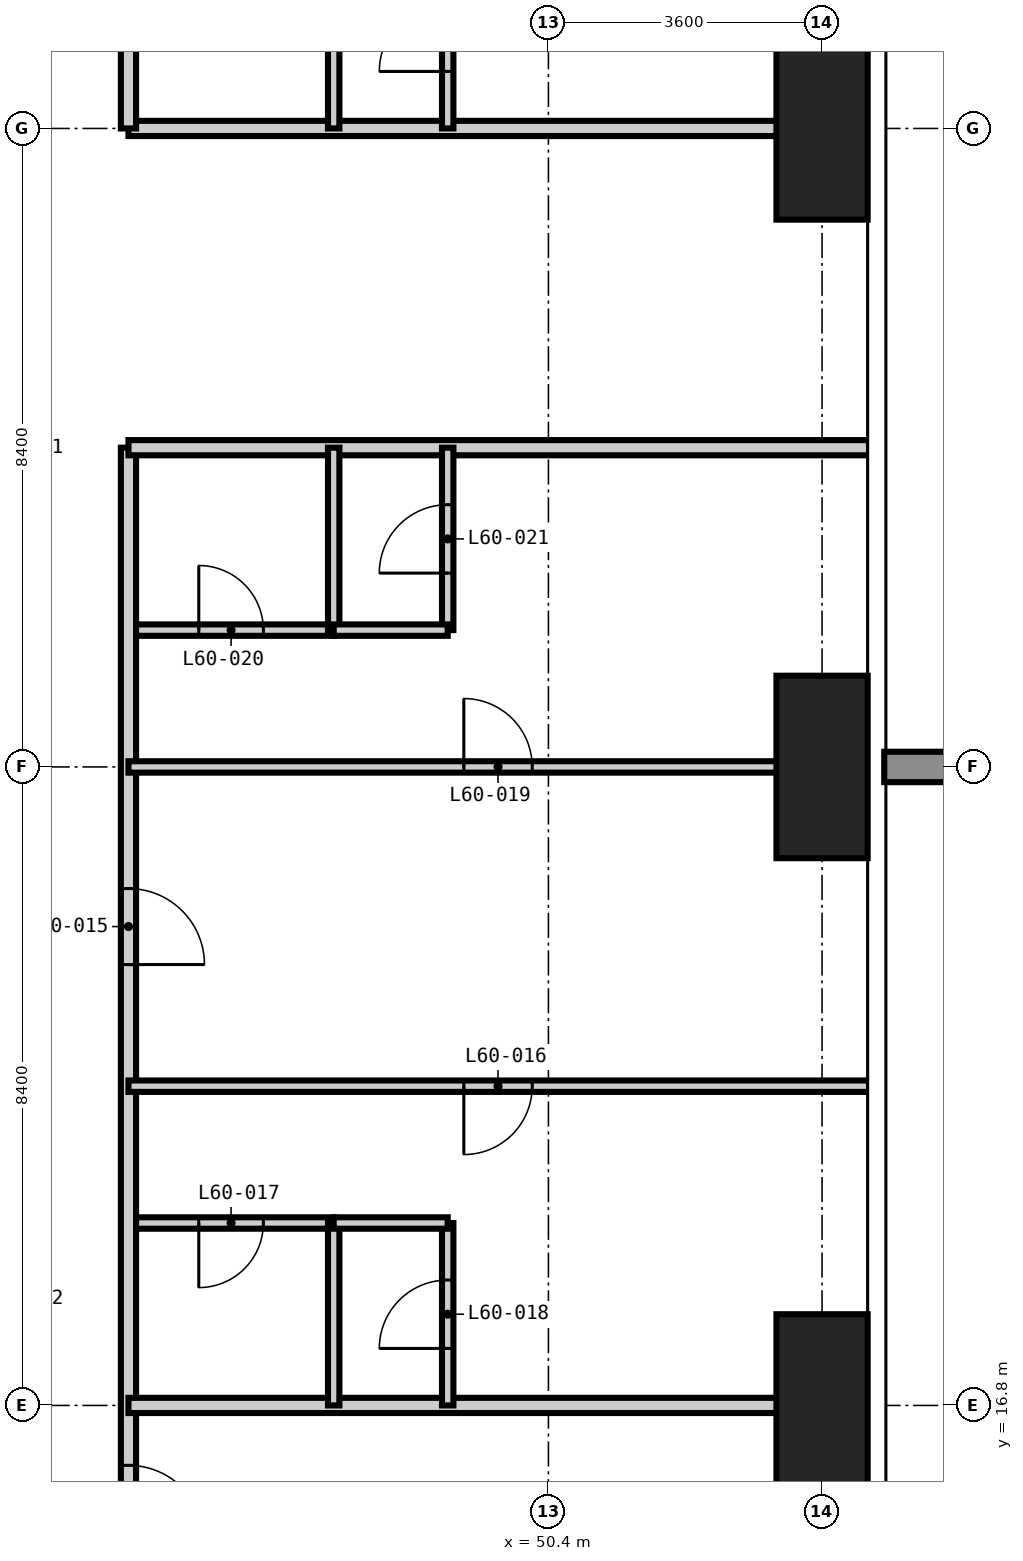
"""IFC4 building model, lengths in metres.
Left out: names, types, materials, properties, quantities, classifications, styles, units other than length and angle.
Written with IfcOpenShell. Run it as: python <this file> out.ifc"""

import sys

from ifc_helpers import new_model, si_unit, direction, frame, frame_2d, origin, origin_2d, place, context, subcontext, project, spatial, rectangle, extrude, element, fill, save


model = new_model("IFC4")
c1 = context("Model", 3, precision=1e-05, world=origin(), true_north=direction((0.0, 1.0)))
c2 = subcontext(c1, "Body", "Model", "MODEL_VIEW")
j1 = project(units=[si_unit("LENGTHUNIT", "METRE"), si_unit("PLANEANGLEUNIT", "RADIAN")], contexts=[c1])
p1 = place(None, origin())
s1 = spatial("IfcSite", under=j1, at=p1, CompositionType="ELEMENT")
p2 = place(p1, origin())
s2 = spatial("IfcBuilding", under=s1, at=p2, CompositionType="ELEMENT")
p3 = place(p2, frame((0.0, 0.0, 233.4)))
s3 = spatial("IfcBuildingStorey", under=s2, at=p3, CompositionType="ELEMENT", Elevation=233.4)
for number, where, z_axis, x_axis in (
    (1, (54.0, 16.8, -0.35), (0.0, 0.0, 1.0), (1.0, 0.0, 0.0)),
    (2, (54.0, 25.2, -0.35), (0.0, 0.0, 1.0), (1.0, 0.0, 0.0)),
    (3, (54.0, 33.6, -0.35), (0.0, 0.0, 1.0), (1.0, 0.0, 0.0)),
):
    element("IfcColumn", number, at=place(p3, frame(where, z_axis=z_axis, x_axis=x_axis)), inside=s3, PredefinedType="COLUMN", context=c2, shape_type="SweptSolid", body=[
        extrude(rectangle(XDim=1.2, YDim=2.4, at=origin_2d()), origin(), (0.0, 0.0, 1.0), 3.9),
    ])
p4 = place(p3, frame((44.875, 19.2, 0.0), z_axis=(0.0, 0.0, 1.0), x_axis=(1.0, 0.0, 0.0)))
e4 = element("IfcWall", 4, at=p4, inside=s3, PredefinedType="PARTITIONING", context=c2, shape_type="SweptSolid", body=[
    extrude(rectangle(XDim=2.7, YDim=0.15, at=frame_2d((1.35, 0.0))), origin(), (0.0, 0.0, 1.0), 3.55),
])
p5 = place(p4, frame((0.925, 0.0, 0.0)))
e5 = element("IfcOpeningElement", 5, at=p5, cuts=e4, PredefinedType="OPENING", context=c2, shape_type="SweptSolid", body=[
    extrude(rectangle(XDim=0.85, YDim=2.1, at=frame_2d((0.425, 1.05))), frame((0.0, 0.085, 0.0), z_axis=(0.0, -1.0, 0.0), x_axis=(1.0, 0.0, 0.0)), (0.0, 0.0, 1.0), 0.17),
])
p6 = place(p3, frame((44.875, 27.0, 0.0), z_axis=(0.0, 0.0, 1.0), x_axis=(1.0, 0.0, 0.0)))
e6 = element("IfcWall", 6, at=p6, inside=s3, PredefinedType="PARTITIONING", context=c2, shape_type="SweptSolid", body=[
    extrude(rectangle(XDim=2.7, YDim=0.15, at=frame_2d((1.35, 0.0))), origin(), (0.0, 0.0, 1.0), 3.55),
])
p7 = place(p6, frame((0.925, 0.0, 0.0)))
e7 = element("IfcOpeningElement", 7, at=p7, cuts=e6, PredefinedType="OPENING", context=c2, shape_type="SweptSolid", body=[
    extrude(rectangle(XDim=0.85, YDim=2.1, at=frame_2d((0.425, 1.05))), frame((0.0, 0.085, 0.0), z_axis=(0.0, -1.0, 0.0), x_axis=(1.0, 0.0, 0.0)), (0.0, 0.0, 1.0), 0.17),
])
p8 = place(p3, frame((44.875, 33.6, 0.0), z_axis=(0.0, 0.0, 1.0), x_axis=(1.0, 0.0, 0.0)))
e8 = element("IfcWall", 8, at=p8, inside=s3, PredefinedType="PARTITIONING", context=c2, shape_type="SweptSolid", body=[
    extrude(rectangle(XDim=9.743, YDim=0.2, at=frame_2d((4.872, 0.0))), origin(), (0.0, 0.0, 1.0), 3.55),
])
p9 = place(p3, frame((44.875, 29.4, 0.0), z_axis=(0.0, 0.0, 1.0), x_axis=(0.0, -1.0, 0.0)))
e9 = element("IfcWall", 9, at=p9, inside=s3, PredefinedType="PARTITIONING", context=c2, shape_type="SweptSolid", body=[
    extrude(rectangle(XDim=15.175, YDim=0.2, at=frame_2d((7.587, 0.0))), origin(), (0.0, 0.0, 1.0), 3.55),
])
p10 = place(p9, frame((5.8, 0.0, 0.0)))
e10 = element("IfcOpeningElement", 10, at=p10, cuts=e9, PredefinedType="OPENING", context=c2, shape_type="SweptSolid", body=[
    extrude(rectangle(XDim=1.0, YDim=2.2, at=frame_2d((0.5, 1.1))), frame((0.0, 0.11, 0.0), z_axis=(0.0, -1.0, 0.0), x_axis=(1.0, 0.0, 0.0)), (0.0, 0.0, 1.0), 0.22),
])
p11 = place(p9, frame((13.388, 0.0, 0.0)))
e11 = element("IfcOpeningElement", 11, at=p11, cuts=e9, PredefinedType="OPENING", context=c2, shape_type="SweptSolid", body=[
    extrude(rectangle(XDim=1.0, YDim=2.2, at=frame_2d((0.5, 1.1))), frame((0.0, 0.11, 0.0), z_axis=(0.0, -1.0, 0.0), x_axis=(1.0, 0.0, 0.0)), (0.0, 0.0, 1.0), 0.22),
])
p12 = place(p3, frame((44.875, 45.175, 0.0), z_axis=(0.0, 0.0, 1.0), x_axis=(0.0, -1.0, 0.0)))
e12 = element("IfcWall", 12, at=p12, inside=s3, PredefinedType="PARTITIONING", context=c2, shape_type="SweptSolid", body=[
    extrude(rectangle(XDim=11.575, YDim=0.2, at=frame_2d((5.788, 0.0))), origin(), (0.0, 0.0, 1.0), 3.55),
])
p13 = place(p12, frame((7.775, 0.0, 0.0)))
e13 = element("IfcOpeningElement", 13, at=p13, cuts=e12, PredefinedType="OPENING", context=c2, shape_type="SweptSolid", body=[
    extrude(rectangle(XDim=1.0, YDim=2.2, at=frame_2d((0.5, 1.1))), frame((0.0, 0.11, 0.0), z_axis=(0.0, -1.0, 0.0), x_axis=(1.0, 0.0, 0.0)), (0.0, 0.0, 1.0), 0.22),
])
p14 = place(p12, frame((5.975, 0.0, 0.0)))
e14 = element("IfcOpeningElement", 14, at=p14, cuts=e12, PredefinedType="OPENING", context=c2, shape_type="SweptSolid", body=[
    extrude(rectangle(XDim=1.0, YDim=2.2, at=frame_2d((0.5, 1.1))), frame((0.0, 0.11, 0.0), z_axis=(0.0, -1.0, 0.0), x_axis=(1.0, 0.0, 0.0)), (0.0, 0.0, 1.0), 0.22),
])
p15 = place(p12, frame((1.088, 0.0, 0.0)))
e15 = element("IfcOpeningElement", 15, at=p15, cuts=e12, PredefinedType="OPENING", context=c2, shape_type="SweptSolid", body=[
    extrude(rectangle(XDim=1.0, YDim=2.2, at=frame_2d((0.5, 1.1))), frame((0.0, 0.11, 0.0), z_axis=(0.0, -1.0, 0.0), x_axis=(1.0, 0.0, 0.0)), (0.0, 0.0, 1.0), 0.22),
])
for number, where, z_axis, x_axis in (
    (16, (54.618, 29.4, 0.0), (0.0, 0.0, 1.0), (-1.0, 0.0, 0.0)),
    (17, (44.875, 16.8, 0.0), (0.0, 0.0, 1.0), (1.0, 0.0, 0.0)),
):
    element("IfcWall", number, at=place(p3, frame(where, z_axis=z_axis, x_axis=x_axis)), inside=s3, PredefinedType="PARTITIONING", context=c2, shape_type="SweptSolid", body=[
        extrude(rectangle(XDim=9.743, YDim=0.2, at=frame_2d((4.872, 0.0))), origin(), (0.0, 0.0, 1.0), 3.55),
    ])
for number, where, z_axis, x_axis in (
    (18, (47.575, 16.8, 0.0), (0.0, 0.0, 1.0), (0.0, 1.0, 0.0)),
    (19, (47.575, 27.0, 0.0), (0.0, 0.0, 1.0), (0.0, 1.0, 0.0)),
    (20, (47.575, 33.6, 0.0), (0.0, 0.0, 1.0), (0.0, 1.0, 0.0)),
):
    element("IfcWall", number, at=place(p3, frame(where, z_axis=z_axis, x_axis=x_axis)), inside=s3, PredefinedType="PARTITIONING", context=c2, shape_type="SweptSolid", body=[
        extrude(rectangle(XDim=2.4, YDim=0.15, at=frame_2d((1.2, 0.0))), origin(), (0.0, 0.0, 1.0), 3.55),
    ])
p16 = place(p3, frame((49.075, 16.8, 0.0), z_axis=(0.0, 0.0, 1.0), x_axis=(0.0, 1.0, 0.0)))
e21 = element("IfcWall", 21, at=p16, inside=s3, PredefinedType="PARTITIONING", context=c2, shape_type="SweptSolid", body=[
    extrude(rectangle(XDim=2.4, YDim=0.15, at=frame_2d((1.2, 0.0))), origin(), (0.0, 0.0, 1.0), 3.55),
])
p17 = place(p16, frame((0.75, 0.0, 0.0)))
e22 = element("IfcOpeningElement", 22, at=p17, cuts=e21, PredefinedType="OPENING", context=c2, shape_type="SweptSolid", body=[
    extrude(rectangle(XDim=0.9, YDim=2.1, at=frame_2d((0.45, 1.05))), frame((0.0, 0.085, 0.0), z_axis=(0.0, -1.0, 0.0), x_axis=(1.0, 0.0, 0.0)), (0.0, 0.0, 1.0), 0.17),
])
p18 = place(p3, frame((49.075, 27.0, 0.0), z_axis=(0.0, 0.0, 1.0), x_axis=(0.0, 1.0, 0.0)))
e23 = element("IfcWall", 23, at=p18, inside=s3, PredefinedType="PARTITIONING", context=c2, shape_type="SweptSolid", body=[
    extrude(rectangle(XDim=2.4, YDim=0.15, at=frame_2d((1.2, 0.0))), origin(), (0.0, 0.0, 1.0), 3.55),
])
p19 = place(p18, frame((0.75, 0.0, 0.0)))
e24 = element("IfcOpeningElement", 24, at=p19, cuts=e23, PredefinedType="OPENING", context=c2, shape_type="SweptSolid", body=[
    extrude(rectangle(XDim=0.9, YDim=2.1, at=frame_2d((0.45, 1.05))), frame((0.0, 0.085, 0.0), z_axis=(0.0, -1.0, 0.0), x_axis=(1.0, 0.0, 0.0)), (0.0, 0.0, 1.0), 0.17),
])
p20 = place(p3, frame((49.075, 33.6, 0.0), z_axis=(0.0, 0.0, 1.0), x_axis=(0.0, 1.0, 0.0)))
e25 = element("IfcWall", 25, at=p20, inside=s3, PredefinedType="PARTITIONING", context=c2, shape_type="SweptSolid", body=[
    extrude(rectangle(XDim=2.4, YDim=0.15, at=frame_2d((1.2, 0.0))), origin(), (0.0, 0.0, 1.0), 3.55),
])
p21 = place(p20, frame((0.75, 0.0, 0.0)))
e26 = element("IfcOpeningElement", 26, at=p21, cuts=e25, PredefinedType="OPENING", context=c2, shape_type="SweptSolid", body=[
    extrude(rectangle(XDim=0.9, YDim=2.1, at=frame_2d((0.45, 1.05))), frame((0.0, 0.085, 0.0), z_axis=(0.0, -1.0, 0.0), x_axis=(1.0, 0.0, 0.0)), (0.0, 0.0, 1.0), 0.17),
])
p22 = place(p3, frame((47.575, 19.2, 0.0), z_axis=(0.0, 0.0, 1.0), x_axis=(1.0, 0.0, 0.0)))
e27 = element("IfcWall", 27, at=p22, inside=s3, PredefinedType="PARTITIONING", context=c2, shape_type="SweptSolid", body=[
    extrude(rectangle(XDim=1.5, YDim=0.15, at=frame_2d((0.75, 0.0))), origin(), (0.0, 0.0, 1.0), 3.55),
])
p23 = place(p3, frame((44.875, 21.0, 0.0), z_axis=(0.0, 0.0, 1.0), x_axis=(1.0, 0.0, 0.0)))
e28 = element("IfcWall", 28, at=p23, inside=s3, PredefinedType="PARTITIONING", context=c2, shape_type="SweptSolid", body=[
    extrude(rectangle(XDim=9.743, YDim=0.15, at=frame_2d((4.872, 0.0))), origin(), (0.0, 0.0, 1.0), 3.55),
])
p24 = place(p23, frame((4.412, 0.0, 0.0)))
e29 = element("IfcOpeningElement", 29, at=p24, cuts=e28, PredefinedType="OPENING", context=c2, shape_type="SweptSolid", body=[
    extrude(rectangle(XDim=0.9, YDim=2.1, at=frame_2d((0.45, 1.05))), frame((0.0, 0.085, 0.0), z_axis=(0.0, -1.0, 0.0), x_axis=(1.0, 0.0, 0.0)), (0.0, 0.0, 1.0), 0.17),
])
p25 = place(p3, frame((44.875, 25.2, 0.0), z_axis=(0.0, 0.0, 1.0), x_axis=(1.0, 0.0, 0.0)))
e30 = element("IfcWall", 30, at=p25, inside=s3, PredefinedType="PARTITIONING", context=c2, shape_type="SweptSolid", body=[
    extrude(rectangle(XDim=9.743, YDim=0.15, at=frame_2d((4.872, 0.0))), origin(), (0.0, 0.0, 1.0), 3.55),
])
p26 = place(p25, frame((4.412, 0.0, 0.0)))
e31 = element("IfcOpeningElement", 31, at=p26, cuts=e30, PredefinedType="OPENING", context=c2, shape_type="SweptSolid", body=[
    extrude(rectangle(XDim=0.9, YDim=2.1, at=frame_2d((0.45, 1.05))), frame((0.0, 0.085, 0.0), z_axis=(0.0, -1.0, 0.0), x_axis=(1.0, 0.0, 0.0)), (0.0, 0.0, 1.0), 0.17),
])
p27 = place(p3, frame((47.575, 27.0, 0.0), z_axis=(0.0, 0.0, 1.0), x_axis=(1.0, 0.0, 0.0)))
e32 = element("IfcWall", 32, at=p27, inside=s3, PredefinedType="PARTITIONING", context=c2, shape_type="SweptSolid", body=[
    extrude(rectangle(XDim=1.5, YDim=0.15, at=frame_2d((0.75, 0.0))), origin(), (0.0, 0.0, 1.0), 3.55),
])
p28 = place(p10, origin())
e33 = element("IfcDoor", 33, at=p28, inside=s3, OperationType="SINGLE_SWING_RIGHT", PredefinedType="DOOR", context=c2, shape_type="SweptSolid", body=[
    extrude(rectangle(XDim=1.0, YDim=2.2, at=frame_2d((0.5, 1.1))), frame((0.0, 0.025, 0.0), z_axis=(0.0, -1.0, 0.0), x_axis=(1.0, 0.0, 0.0)), (0.0, 0.0, 1.0), 0.05),
])
fill(e10, e33)
p29 = place(p24, frame((0.9, 0.0, 0.0), z_axis=(0.0, 0.0, 1.0), x_axis=(-1.0, 0.0, 0.0)))
e34 = element("IfcDoor", 34, at=p29, inside=s3, OperationType="SINGLE_SWING_RIGHT", PredefinedType="DOOR", context=c2, shape_type="SweptSolid", body=[
    extrude(rectangle(XDim=0.9, YDim=2.1, at=frame_2d((0.45, 1.05))), frame((0.0, 0.025, 0.0), z_axis=(0.0, -1.0, 0.0), x_axis=(1.0, 0.0, 0.0)), (0.0, 0.0, 1.0), 0.05),
])
fill(e29, e34)
p30 = place(p5, frame((0.85, 0.0, 0.0), z_axis=(0.0, 0.0, 1.0), x_axis=(-1.0, 0.0, 0.0)))
e35 = element("IfcDoor", 35, at=p30, inside=s3, OperationType="SINGLE_SWING_RIGHT", PredefinedType="DOOR", context=c2, shape_type="SweptSolid", body=[
    extrude(rectangle(XDim=0.85, YDim=2.1, at=frame_2d((0.425, 1.05))), frame((0.0, 0.025, 0.0), z_axis=(0.0, -1.0, 0.0), x_axis=(1.0, 0.0, 0.0)), (0.0, 0.0, 1.0), 0.05),
])
fill(e5, e35)
p31 = place(p17, origin())
e36 = element("IfcDoor", 36, at=p31, inside=s3, OperationType="SINGLE_SWING_LEFT", PredefinedType="DOOR", context=c2, shape_type="SweptSolid", body=[
    extrude(rectangle(XDim=0.9, YDim=2.1, at=frame_2d((0.45, 1.05))), frame((0.0, 0.025, 0.0), z_axis=(0.0, -1.0, 0.0), x_axis=(1.0, 0.0, 0.0)), (0.0, 0.0, 1.0), 0.05),
])
fill(e22, e36)
p32 = place(p26, origin())
e37 = element("IfcDoor", 37, at=p32, inside=s3, OperationType="SINGLE_SWING_LEFT", PredefinedType="DOOR", context=c2, shape_type="SweptSolid", body=[
    extrude(rectangle(XDim=0.9, YDim=2.1, at=frame_2d((0.45, 1.05))), frame((0.0, 0.025, 0.0), z_axis=(0.0, -1.0, 0.0), x_axis=(1.0, 0.0, 0.0)), (0.0, 0.0, 1.0), 0.05),
])
fill(e31, e37)
p33 = place(p7, origin())
e38 = element("IfcDoor", 38, at=p33, inside=s3, OperationType="SINGLE_SWING_LEFT", PredefinedType="DOOR", context=c2, shape_type="SweptSolid", body=[
    extrude(rectangle(XDim=0.85, YDim=2.1, at=frame_2d((0.425, 1.05))), frame((0.0, 0.025, 0.0), z_axis=(0.0, -1.0, 0.0), x_axis=(1.0, 0.0, 0.0)), (0.0, 0.0, 1.0), 0.05),
])
fill(e7, e38)
p34 = place(p19, origin())
e39 = element("IfcDoor", 39, at=p34, inside=s3, OperationType="SINGLE_SWING_LEFT", PredefinedType="DOOR", context=c2, shape_type="SweptSolid", body=[
    extrude(rectangle(XDim=0.9, YDim=2.1, at=frame_2d((0.45, 1.05))), frame((0.0, 0.025, 0.0), z_axis=(0.0, -1.0, 0.0), x_axis=(1.0, 0.0, 0.0)), (0.0, 0.0, 1.0), 0.05),
])
fill(e24, e39)
p35 = place(p21, origin())
e40 = element("IfcDoor", 40, at=p35, inside=s3, OperationType="SINGLE_SWING_LEFT", PredefinedType="DOOR", context=c2, shape_type="SweptSolid", body=[
    extrude(rectangle(XDim=0.9, YDim=2.1, at=frame_2d((0.45, 1.05))), frame((0.0, 0.025, 0.0), z_axis=(0.0, -1.0, 0.0), x_axis=(1.0, 0.0, 0.0)), (0.0, 0.0, 1.0), 0.05),
])
fill(e26, e40)
p36 = place(p11, origin())
e41 = element("IfcDoor", 41, at=p36, inside=s3, OperationType="SINGLE_SWING_RIGHT", PredefinedType="DOOR", context=c2, shape_type="SweptSolid", body=[
    extrude(rectangle(XDim=1.0, YDim=2.2, at=frame_2d((0.5, 1.1))), frame((0.0, 0.025, 0.0), z_axis=(0.0, -1.0, 0.0), x_axis=(1.0, 0.0, 0.0)), (0.0, 0.0, 1.0), 0.05),
])
fill(e11, e41)
save(model, sys.argv[1])
